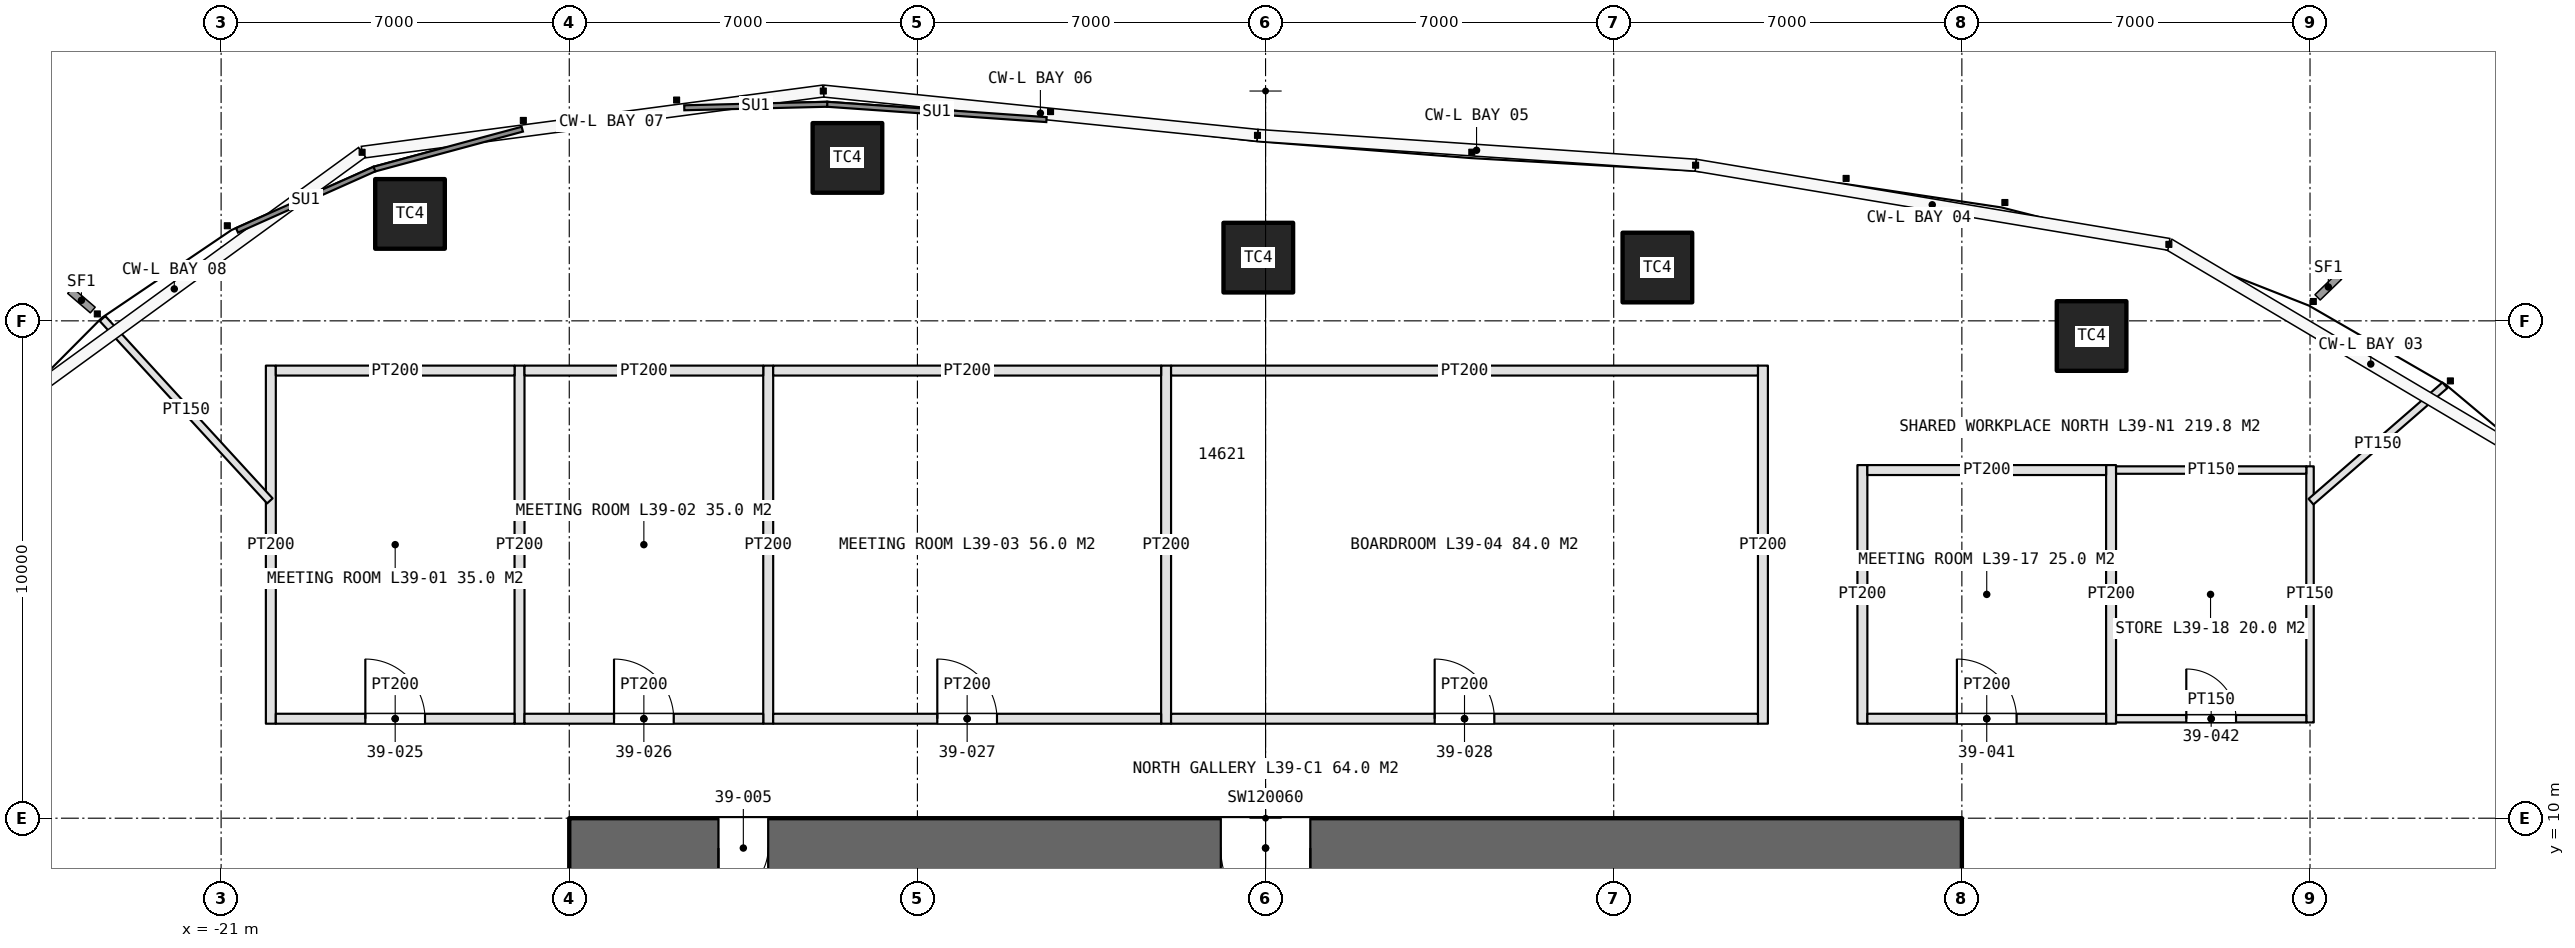
"""IFC4 building model, lengths in metres.
Left out: names, types, materials, properties, quantities, classifications, styles, units other than length and angle.
Written with IfcOpenShell. Run it as: python <this file> out.ifc"""

import sys

from ifc_helpers import new_model, si_unit, direction, frame, frame_2d, origin, origin_2d, place, context, subcontext, project, spatial, rectangle, extrude, element, fill, save


model = new_model("IFC4")
c1 = context("Model", 3, precision=1e-05, world=origin(), true_north=direction((0.0, 1.0)))
c2 = subcontext(c1, "Body", "Model", "MODEL_VIEW")
j1 = project(units=[si_unit("LENGTHUNIT", "METRE"), si_unit("PLANEANGLEUNIT", "RADIAN")], contexts=[c1])
p1 = place(None, origin())
s1 = spatial("IfcSite", under=j1, at=p1, CompositionType="ELEMENT")
p2 = place(p1, origin())
s2 = spatial("IfcBuilding", under=s1, at=p2, CompositionType="ELEMENT")
p3 = place(p2, frame((0.0, 0.0, 180.6)))
s3 = spatial("IfcBuildingStorey", under=s2, at=p3, CompositionType="ELEMENT", Elevation=180.6)
p4 = place(p3, frame((14.0, 9.4, 0.0), z_axis=(0.0, 0.0, 1.0), x_axis=(-1.0, 0.0, 0.0)))
e1 = element("IfcWall", 1, at=p4, inside=s3, PredefinedType="SHEAR", context=c2, shape_type="SweptSolid", body=[
    extrude(rectangle(XDim=28.0, YDim=1.2, at=frame_2d((14.0, 0.0))), origin(), (0.0, 0.0, 1.0), 4.2),
])
p5 = place(p4, frame((24.0, 0.0, 0.0)))
e2 = element("IfcOpeningElement", 2, at=p5, cuts=e1, PredefinedType="OPENING", context=c2, shape_type="SweptSolid", body=[
    extrude(rectangle(XDim=1.0, YDim=2.4, at=frame_2d((0.5, 1.2))), frame((0.0, 0.61, 0.0), z_axis=(0.0, -1.0, 0.0), x_axis=(1.0, 0.0, 0.0)), (0.0, 0.0, 1.0), 1.22),
])
p6 = place(p4, frame((13.1, 0.0, 0.0)))
e3 = element("IfcOpeningElement", 3, at=p6, cuts=e1, PredefinedType="OPENING", context=c2, shape_type="SweptSolid", body=[
    extrude(rectangle(XDim=1.8, YDim=2.4, at=frame_2d((0.9, 1.2))), frame((0.0, 0.61, 0.0), z_axis=(0.0, -1.0, 0.0), x_axis=(1.0, 0.0, 0.0)), (0.0, 0.0, 1.0), 1.22),
])
for number, where, z_axis, x_axis in (
    (4, (16.608, 19.695, 0.0), (0.0, 0.0, 1.0), (1.0, 0.0, 0.0)),
    (5, (7.878, 21.072, 0.0), (0.0, 0.0, 1.0), (1.0, 0.0, 0.0)),
    (6, (-0.146, 21.271, 0.0), (0.0, 0.0, 1.0), (1.0, 0.0, 0.0)),
    (7, (-8.407, 23.276, 0.0), (0.0, 0.0, 1.0), (1.0, 0.0, 0.0)),
    (8, (-17.202, 22.15, 0.0), (0.0, 0.0, 1.0), (1.0, 0.0, 0.0)),
):
    element("IfcColumn", number, at=place(p3, frame(where, z_axis=z_axis, x_axis=x_axis)), inside=s3, PredefinedType="COLUMN", context=c2, shape_type="SweptSolid", body=[
        extrude(rectangle(XDim=1.4, YDim=1.4, at=origin_2d()), origin(), (0.0, 0.0, 1.0), 4.2),
    ])
for number, where, z_axis, x_axis in (
    (9, (-20.0, 11.9, 0.0), (0.0, 0.0, 1.0), (0.0, 1.0, 0.0)),
    (10, (-15.0, 11.9, 0.0), (0.0, 0.0, 1.0), (0.0, 1.0, 0.0)),
    (11, (-10.0, 11.9, 0.0), (0.0, 0.0, 1.0), (0.0, 1.0, 0.0)),
    (12, (-2.0, 11.9, 0.0), (0.0, 0.0, 1.0), (0.0, 1.0, 0.0)),
    (13, (10.0, 11.9, 0.0), (0.0, 0.0, 1.0), (0.0, 1.0, 0.0)),
):
    element("IfcWall", number, at=place(p3, frame(where, z_axis=z_axis, x_axis=x_axis)), inside=s3, PredefinedType="PARTITIONING", context=c2, shape_type="SweptSolid", body=[
        extrude(rectangle(XDim=7.2, YDim=0.2, at=frame_2d((3.6, 0.0))), origin(), (0.0, 0.0, 1.0), 3.0),
    ])
p7 = place(p3, frame((-19.9, 12.0, 0.0), z_axis=(0.0, 0.0, 1.0), x_axis=(1.0, 0.0, 0.0)))
e14 = element("IfcWall", 14, at=p7, inside=s3, PredefinedType="PARTITIONING", context=c2, shape_type="SweptSolid", body=[
    extrude(rectangle(XDim=4.8, YDim=0.2, at=frame_2d((2.4, 0.0))), origin(), (0.0, 0.0, 1.0), 3.0),
])
p8 = place(p7, frame((1.8, 0.0, 0.0)))
e15 = element("IfcOpeningElement", 15, at=p8, cuts=e14, PredefinedType="OPENING", context=c2, shape_type="SweptSolid", body=[
    extrude(rectangle(XDim=1.2, YDim=2.4, at=frame_2d((0.6, 1.2))), frame((0.0, 0.11, 0.0), z_axis=(0.0, -1.0, 0.0), x_axis=(1.0, 0.0, 0.0)), (0.0, 0.0, 1.0), 0.22),
])
p9 = place(p3, frame((-19.9, 19.0, 0.0), z_axis=(0.0, 0.0, 1.0), x_axis=(1.0, 0.0, 0.0)))
e16 = element("IfcWall", 16, at=p9, inside=s3, PredefinedType="PARTITIONING", context=c2, shape_type="SweptSolid", body=[
    extrude(rectangle(XDim=4.8, YDim=0.2, at=frame_2d((2.4, 0.0))), origin(), (0.0, 0.0, 1.0), 3.0),
])
p10 = place(p3, frame((-14.9, 12.0, 0.0), z_axis=(0.0, 0.0, 1.0), x_axis=(1.0, 0.0, 0.0)))
e17 = element("IfcWall", 17, at=p10, inside=s3, PredefinedType="PARTITIONING", context=c2, shape_type="SweptSolid", body=[
    extrude(rectangle(XDim=4.8, YDim=0.2, at=frame_2d((2.4, 0.0))), origin(), (0.0, 0.0, 1.0), 3.0),
])
p11 = place(p10, frame((1.8, 0.0, 0.0)))
e18 = element("IfcOpeningElement", 18, at=p11, cuts=e17, PredefinedType="OPENING", context=c2, shape_type="SweptSolid", body=[
    extrude(rectangle(XDim=1.2, YDim=2.4, at=frame_2d((0.6, 1.2))), frame((0.0, 0.11, 0.0), z_axis=(0.0, -1.0, 0.0), x_axis=(1.0, 0.0, 0.0)), (0.0, 0.0, 1.0), 0.22),
])
p12 = place(p3, frame((-14.9, 19.0, 0.0), z_axis=(0.0, 0.0, 1.0), x_axis=(1.0, 0.0, 0.0)))
e19 = element("IfcWall", 19, at=p12, inside=s3, PredefinedType="PARTITIONING", context=c2, shape_type="SweptSolid", body=[
    extrude(rectangle(XDim=4.8, YDim=0.2, at=frame_2d((2.4, 0.0))), origin(), (0.0, 0.0, 1.0), 3.0),
])
p13 = place(p3, frame((-9.9, 12.0, 0.0), z_axis=(0.0, 0.0, 1.0), x_axis=(1.0, 0.0, 0.0)))
e20 = element("IfcWall", 20, at=p13, inside=s3, PredefinedType="PARTITIONING", context=c2, shape_type="SweptSolid", body=[
    extrude(rectangle(XDim=7.8, YDim=0.2, at=frame_2d((3.9, 0.0))), origin(), (0.0, 0.0, 1.0), 3.0),
])
p14 = place(p13, frame((3.3, 0.0, 0.0)))
e21 = element("IfcOpeningElement", 21, at=p14, cuts=e20, PredefinedType="OPENING", context=c2, shape_type="SweptSolid", body=[
    extrude(rectangle(XDim=1.2, YDim=2.4, at=frame_2d((0.6, 1.2))), frame((0.0, 0.11, 0.0), z_axis=(0.0, -1.0, 0.0), x_axis=(1.0, 0.0, 0.0)), (0.0, 0.0, 1.0), 0.22),
])
p15 = place(p3, frame((-9.9, 19.0, 0.0), z_axis=(0.0, 0.0, 1.0), x_axis=(1.0, 0.0, 0.0)))
e22 = element("IfcWall", 22, at=p15, inside=s3, PredefinedType="PARTITIONING", context=c2, shape_type="SweptSolid", body=[
    extrude(rectangle(XDim=7.8, YDim=0.2, at=frame_2d((3.9, 0.0))), origin(), (0.0, 0.0, 1.0), 3.0),
])
p16 = place(p3, frame((-1.9, 12.0, 0.0), z_axis=(0.0, 0.0, 1.0), x_axis=(1.0, 0.0, 0.0)))
e23 = element("IfcWall", 23, at=p16, inside=s3, PredefinedType="PARTITIONING", context=c2, shape_type="SweptSolid", body=[
    extrude(rectangle(XDim=11.8, YDim=0.2, at=frame_2d((5.9, 0.0))), origin(), (0.0, 0.0, 1.0), 3.0),
])
p17 = place(p16, frame((5.3, 0.0, 0.0)))
e24 = element("IfcOpeningElement", 24, at=p17, cuts=e23, PredefinedType="OPENING", context=c2, shape_type="SweptSolid", body=[
    extrude(rectangle(XDim=1.2, YDim=2.4, at=frame_2d((0.6, 1.2))), frame((0.0, 0.11, 0.0), z_axis=(0.0, -1.0, 0.0), x_axis=(1.0, 0.0, 0.0)), (0.0, 0.0, 1.0), 0.22),
])
p18 = place(p3, frame((-1.9, 19.0, 0.0), z_axis=(0.0, 0.0, 1.0), x_axis=(1.0, 0.0, 0.0)))
e25 = element("IfcWall", 25, at=p18, inside=s3, PredefinedType="PARTITIONING", context=c2, shape_type="SweptSolid", body=[
    extrude(rectangle(XDim=11.8, YDim=0.2, at=frame_2d((5.9, 0.0))), origin(), (0.0, 0.0, 1.0), 3.0),
])
for number, where, z_axis, x_axis in (
    (26, (12.0, 11.9, 0.0), (0.0, 0.0, 1.0), (0.0, 1.0, 0.0)),
    (27, (17.0, 11.9, 0.0), (0.0, 0.0, 1.0), (0.0, 1.0, 0.0)),
):
    element("IfcWall", number, at=place(p3, frame(where, z_axis=z_axis, x_axis=x_axis)), inside=s3, PredefinedType="PARTITIONING", context=c2, shape_type="SweptSolid", body=[
        extrude(rectangle(XDim=5.2, YDim=0.2, at=frame_2d((2.6, 0.0))), origin(), (0.0, 0.0, 1.0), 3.0),
    ])
p19 = place(p3, frame((21.0, 11.925, 0.0), z_axis=(0.0, 0.0, 1.0), x_axis=(0.0, 1.0, 0.0)))
e28 = element("IfcWall", 28, at=p19, inside=s3, PredefinedType="PARTITIONING", context=c2, shape_type="SweptSolid", body=[
    extrude(rectangle(XDim=5.15, YDim=0.15, at=frame_2d((2.575, 0.0))), origin(), (0.0, 0.0, 1.0), 3.0),
])
p20 = place(p3, frame((12.1, 12.0, 0.0), z_axis=(0.0, 0.0, 1.0), x_axis=(1.0, 0.0, 0.0)))
e29 = element("IfcWall", 29, at=p20, inside=s3, PredefinedType="PARTITIONING", context=c2, shape_type="SweptSolid", body=[
    extrude(rectangle(XDim=4.8, YDim=0.2, at=frame_2d((2.4, 0.0))), origin(), (0.0, 0.0, 1.0), 3.0),
])
p21 = place(p20, frame((1.8, 0.0, 0.0)))
e30 = element("IfcOpeningElement", 30, at=p21, cuts=e29, PredefinedType="OPENING", context=c2, shape_type="SweptSolid", body=[
    extrude(rectangle(XDim=1.2, YDim=2.4, at=frame_2d((0.6, 1.2))), frame((0.0, 0.11, 0.0), z_axis=(0.0, -1.0, 0.0), x_axis=(1.0, 0.0, 0.0)), (0.0, 0.0, 1.0), 0.22),
])
p22 = place(p3, frame((12.1, 17.0, 0.0), z_axis=(0.0, 0.0, 1.0), x_axis=(1.0, 0.0, 0.0)))
e31 = element("IfcWall", 31, at=p22, inside=s3, PredefinedType="PARTITIONING", context=c2, shape_type="SweptSolid", body=[
    extrude(rectangle(XDim=4.8, YDim=0.2, at=frame_2d((2.4, 0.0))), origin(), (0.0, 0.0, 1.0), 3.0),
])
p23 = place(p3, frame((17.1, 12.0, 0.0), z_axis=(0.0, 0.0, 1.0), x_axis=(1.0, 0.0, 0.0)))
e32 = element("IfcWall", 32, at=p23, inside=s3, PredefinedType="PARTITIONING", context=c2, shape_type="SweptSolid", body=[
    extrude(rectangle(XDim=3.825, YDim=0.15, at=frame_2d((1.913, 0.0))), origin(), (0.0, 0.0, 1.0), 3.0),
])
p24 = place(p23, frame((1.413, 0.0, 0.0)))
e33 = element("IfcOpeningElement", 33, at=p24, cuts=e32, PredefinedType="OPENING", context=c2, shape_type="SweptSolid", body=[
    extrude(rectangle(XDim=1.0, YDim=2.2, at=frame_2d((0.5, 1.1))), frame((0.0, 0.085, 0.0), z_axis=(0.0, -1.0, 0.0), x_axis=(1.0, 0.0, 0.0)), (0.0, 0.0, 1.0), 0.17),
])
p25 = place(p3, frame((17.1, 17.0, 0.0), z_axis=(0.0, 0.0, 1.0), x_axis=(1.0, 0.0, 0.0)))
e34 = element("IfcWall", 34, at=p25, inside=s3, PredefinedType="PARTITIONING", context=c2, shape_type="SweptSolid", body=[
    extrude(rectangle(XDim=3.825, YDim=0.15, at=frame_2d((1.913, 0.0))), origin(), (0.0, 0.0, 1.0), 3.0),
])
p26 = place(p3, frame((-20.02, 16.38, 0.0), z_axis=(0.0, 0.0, 1.0), x_axis=(-0.676159982548, 0.736754828963, 0.0)))
e35 = element("IfcWall", 35, at=p26, inside=s3, PredefinedType="PARTITIONING", context=c2, shape_type="SweptSolid", body=[
    extrude(rectangle(XDim=4.976, YDim=0.15, at=frame_2d((2.488, 0.0))), origin(), (0.0, 0.0, 1.0), 3.0),
])
p27 = place(p3, frame((21.02, 16.364, 0.0), z_axis=(0.0, 0.0, 1.0), x_axis=(0.75467183248, 0.656102450278, 0.0)))
e36 = element("IfcWall", 36, at=p27, inside=s3, PredefinedType="PARTITIONING", context=c2, shape_type="SweptSolid", body=[
    extrude(rectangle(XDim=3.567, YDim=0.15, at=frame_2d((1.783, 0.0))), origin(), (0.0, 0.0, 1.0), 3.0),
])
p28 = place(p5, origin())
e37 = element("IfcDoor", 37, at=p28, inside=s3, OperationType="SINGLE_SWING_RIGHT", PredefinedType="DOOR", context=c2, shape_type="SweptSolid", body=[
    extrude(rectangle(XDim=1.0, YDim=2.4, at=frame_2d((0.5, 1.2))), frame((0.0, 0.025, 0.0), z_axis=(0.0, -1.0, 0.0), x_axis=(1.0, 0.0, 0.0)), (0.0, 0.0, 1.0), 0.05),
])
fill(e2, e37)
p29 = place(p6, origin())
e38 = element("IfcDoor", 38, at=p29, inside=s3, OperationType="DOUBLE_DOOR_SINGLE_SWING", PredefinedType="DOOR", context=c2, shape_type="SweptSolid", body=[
    extrude(rectangle(XDim=1.8, YDim=2.4, at=frame_2d((0.9, 1.2))), frame((0.0, 0.025, 0.0), z_axis=(0.0, -1.0, 0.0), x_axis=(1.0, 0.0, 0.0)), (0.0, 0.0, 1.0), 0.05),
])
fill(e3, e38)
p30 = place(p8, origin())
e39 = element("IfcDoor", 39, at=p30, inside=s3, OperationType="SINGLE_SWING_LEFT", PredefinedType="DOOR", context=c2, shape_type="SweptSolid", body=[
    extrude(rectangle(XDim=1.2, YDim=2.4, at=frame_2d((0.6, 1.2))), frame((0.0, 0.025, 0.0), z_axis=(0.0, -1.0, 0.0), x_axis=(1.0, 0.0, 0.0)), (0.0, 0.0, 1.0), 0.05),
])
fill(e15, e39)
p31 = place(p11, origin())
e40 = element("IfcDoor", 40, at=p31, inside=s3, OperationType="SINGLE_SWING_LEFT", PredefinedType="DOOR", context=c2, shape_type="SweptSolid", body=[
    extrude(rectangle(XDim=1.2, YDim=2.4, at=frame_2d((0.6, 1.2))), frame((0.0, 0.025, 0.0), z_axis=(0.0, -1.0, 0.0), x_axis=(1.0, 0.0, 0.0)), (0.0, 0.0, 1.0), 0.05),
])
fill(e18, e40)
p32 = place(p14, origin())
e41 = element("IfcDoor", 41, at=p32, inside=s3, OperationType="SINGLE_SWING_LEFT", PredefinedType="DOOR", context=c2, shape_type="SweptSolid", body=[
    extrude(rectangle(XDim=1.2, YDim=2.4, at=frame_2d((0.6, 1.2))), frame((0.0, 0.025, 0.0), z_axis=(0.0, -1.0, 0.0), x_axis=(1.0, 0.0, 0.0)), (0.0, 0.0, 1.0), 0.05),
])
fill(e21, e41)
p33 = place(p17, origin())
e42 = element("IfcDoor", 42, at=p33, inside=s3, OperationType="SINGLE_SWING_LEFT", PredefinedType="DOOR", context=c2, shape_type="SweptSolid", body=[
    extrude(rectangle(XDim=1.2, YDim=2.4, at=frame_2d((0.6, 1.2))), frame((0.0, 0.025, 0.0), z_axis=(0.0, -1.0, 0.0), x_axis=(1.0, 0.0, 0.0)), (0.0, 0.0, 1.0), 0.05),
])
fill(e24, e42)
p34 = place(p21, origin())
e43 = element("IfcDoor", 43, at=p34, inside=s3, OperationType="SINGLE_SWING_LEFT", PredefinedType="DOOR", context=c2, shape_type="SweptSolid", body=[
    extrude(rectangle(XDim=1.2, YDim=2.4, at=frame_2d((0.6, 1.2))), frame((0.0, 0.025, 0.0), z_axis=(0.0, -1.0, 0.0), x_axis=(1.0, 0.0, 0.0)), (0.0, 0.0, 1.0), 0.05),
])
fill(e30, e43)
p35 = place(p24, origin())
e44 = element("IfcDoor", 44, at=p35, inside=s3, OperationType="SINGLE_SWING_LEFT", PredefinedType="DOOR", context=c2, shape_type="SweptSolid", body=[
    extrude(rectangle(XDim=1.0, YDim=2.2, at=frame_2d((0.5, 1.1))), frame((0.0, 0.025, 0.0), z_axis=(0.0, -1.0, 0.0), x_axis=(1.0, 0.0, 0.0)), (0.0, 0.0, 1.0), 0.05),
])
fill(e33, e44)
save(model, sys.argv[1])
